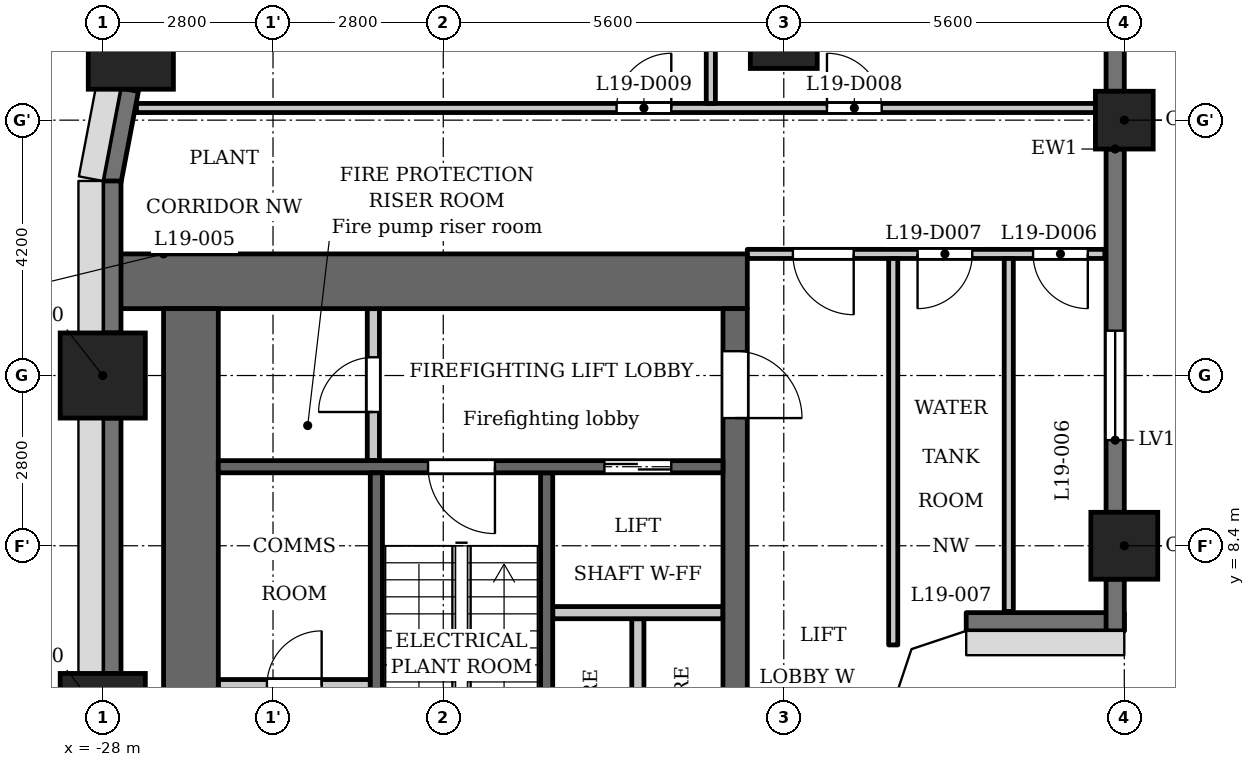
"""IFC4 building model, lengths in metres.
Left out: names, types, materials, properties, quantities, classifications, styles, units other than length and angle.
Written with IfcOpenShell. Run it as: python <this file> out.ifc"""

import sys

from ifc_helpers import new_model, si_unit, direction, frame, frame_2d, origin, origin_2d, place, context, subcontext, project, spatial, polyline, rectangle, outline, extrude, element, fill, save


model = new_model("IFC4")
c1 = context("Model", 3, precision=1e-05, world=origin(), true_north=direction((0.0, 1.0)))
c2 = subcontext(c1, "Body", "Model", "MODEL_VIEW")
j1 = project(units=[si_unit("LENGTHUNIT", "METRE"), si_unit("PLANEANGLEUNIT", "RADIAN")], contexts=[c1])
p1 = place(None, origin())
s1 = spatial("IfcSite", under=j1, at=p1, CompositionType="ELEMENT")
p2 = place(p1, origin())
s2 = spatial("IfcBuilding", under=s1, at=p2, CompositionType="ELEMENT")
p3 = place(p2, frame((0.0, 0.0, 77.9)))
s3 = spatial("IfcBuildingStorey", under=s2, at=p3, CompositionType="ELEMENT", Elevation=77.9)
for number, where, z_axis, x_axis in (
    (1, (-27.538, 16.609, 0.0), (0.0, 0.0, 1.0), (1.0, 0.0, 0.0)),
    (2, (-28.0, 11.2, 0.0), (0.0, 0.0, 1.0), (1.0, 0.0, 0.0)),
    (3, (-28.0, 5.6, 0.0), (0.0, 0.0, 1.0), (1.0, 0.0, 0.0)),
):
    element("IfcColumn", number, at=place(p3, frame(where, z_axis=z_axis, x_axis=x_axis)), inside=s3, PredefinedType="COLUMN", context=c2, shape_type="SweptSolid", body=[
        extrude(rectangle(XDim=1.4, YDim=1.4, at=origin_2d()), origin(), (0.0, 0.0, 1.0), 5.4),
    ])
for number, where, z_axis, x_axis in (
    (4, (-16.8, 16.8, 0.0), (0.0, 0.0, 1.0), (1.0, 0.0, 0.0)),
    (5, (-11.2, 8.4, 0.0), (0.0, 0.0, 1.0), (1.0, 0.0, 0.0)),
):
    element("IfcColumn", number, at=place(p3, frame(where, z_axis=z_axis, x_axis=x_axis)), inside=s3, PredefinedType="COLUMN", context=c2, shape_type="SweptSolid", body=[
        extrude(rectangle(XDim=1.1, YDim=1.1, at=origin_2d()), origin(), (0.0, 0.0, 1.0), 5.4),
    ])
p4 = place(p3, frame((-11.2, 15.4, 0.0), z_axis=(0.0, 0.0, 1.0), x_axis=(1.0, 0.0, 0.0)))
e6 = element("IfcColumn", 6, at=p4, inside=s3, PredefinedType="COLUMN", context=c2, shape_type="SweptSolid", body=[
    extrude(rectangle(XDim=0.95, YDim=0.95, at=origin_2d()), origin(), (0.0, 0.0, 1.0), 5.4),
])
p5 = place(p3, frame((-13.8, 7.15, 0.0), z_axis=(0.0, 0.0, 1.0), x_axis=(1.0, 0.0, 0.0)))
e7 = element("IfcWall", 7, at=p5, inside=s3, PredefinedType="SOLIDWALL", context=c2, shape_type="SweptSolid", body=[
    extrude(rectangle(XDim=2.6, YDim=0.3, at=frame_2d((1.3, 0.0))), origin(), (0.0, 0.0, 1.0), 5.1),
])
p6 = place(p3, frame((-11.35, 7.0, 0.0), z_axis=(0.0, 0.0, 1.0), x_axis=(0.0, 1.0, 0.0)))
e8 = element("IfcWall", 8, at=p6, inside=s3, PredefinedType="SOLIDWALL", context=c2, shape_type="SweptSolid", body=[
    extrude(rectangle(XDim=0.85, YDim=0.3, at=frame_2d((0.425, 0.0))), origin(), (0.0, 0.0, 1.0), 5.1),
])
p7 = place(p3, frame((-11.35, 8.95, 0.0), z_axis=(0.0, 0.0, 1.0), x_axis=(0.0, 1.0, 0.0)))
e9 = element("IfcWall", 9, at=p7, inside=s3, PredefinedType="SOLIDWALL", context=c2, shape_type="SweptSolid", body=[
    extrude(rectangle(XDim=5.975, YDim=0.3, at=frame_2d((2.988, 0.0))), origin(), (0.0, 0.0, 1.0), 5.1),
])
p8 = place(p7, frame((1.188, 0.0, 0.9)))
e10 = element("IfcOpeningElement", 10, at=p8, cuts=e9, PredefinedType="OPENING", context=c2, shape_type="SweptSolid", body=[
    extrude(rectangle(XDim=1.8, YDim=1.5, at=frame_2d((0.9, 0.75))), frame((0.0, 0.16, 0.0), z_axis=(0.0, -1.0, 0.0), x_axis=(1.0, 0.0, 0.0)), (0.0, 0.0, 1.0), 0.32),
])
p9 = place(p3, frame((-11.35, 15.875, 0.0), z_axis=(0.0, 0.0, 1.0), x_axis=(0.0, 1.0, 0.0)))
e11 = element("IfcWall", 11, at=p9, inside=s3, PredefinedType="SOLIDWALL", context=c2, shape_type="SweptSolid", body=[
    extrude(rectangle(XDim=5.825, YDim=0.3, at=frame_2d((2.913, 0.0))), origin(), (0.0, 0.0, 1.0), 5.1),
])
p10 = place(p9, frame((2.012, 0.0, 0.9)))
e12 = element("IfcOpeningElement", 12, at=p10, cuts=e11, PredefinedType="OPENING", context=c2, shape_type="SweptSolid", body=[
    extrude(rectangle(XDim=1.8, YDim=1.5, at=frame_2d((0.9, 0.75))), frame((0.0, 0.16, 0.0), z_axis=(0.0, -1.0, 0.0), x_axis=(1.0, 0.0, 0.0)), (0.0, 0.0, 1.0), 0.32),
])
p11 = place(p3, frame((-27.561, 15.9, 0.0), z_axis=(0.0, 0.0, 1.0), x_axis=(-0.187328386968, -0.982297345734, 0.0)))
e13 = element("IfcWall", 13, at=p11, inside=s3, PredefinedType="SOLIDWALL", context=c2, shape_type="SweptSolid", body=[
    extrude(rectangle(XDim=1.556, YDim=0.3, at=frame_2d((0.778, 0.0))), origin(), (0.0, 0.0, 1.0), 4.25),
])
p12 = place(p3, frame((-27.85, 14.4, 0.0), z_axis=(0.0, 0.0, 1.0), x_axis=(0.0, -1.0, 0.0)))
e14 = element("IfcWall", 14, at=p12, inside=s3, PredefinedType="SOLIDWALL", context=c2, shape_type="SweptSolid", body=[
    extrude(rectangle(XDim=2.5, YDim=0.3, at=frame_2d((1.25, 0.0))), origin(), (0.0, 0.0, 1.0), 4.25),
])
p13 = place(p3, frame((-27.85, 10.5, 0.0), z_axis=(0.0, 0.0, 1.0), x_axis=(0.0, -1.0, 0.0)))
e15 = element("IfcWall", 15, at=p13, inside=s3, PredefinedType="SOLIDWALL", context=c2, shape_type="SweptSolid", body=[
    extrude(rectangle(XDim=4.2, YDim=0.3, at=frame_2d((2.1, 0.0))), origin(), (0.0, 0.0, 1.0), 4.25),
])
p14 = place(p3, frame((-20.7, 2.6, 0.0), z_axis=(0.0, 0.0, 1.0), x_axis=(0.0, 1.0, 0.0)))
e16 = element("IfcWall", 16, at=p14, inside=s3, PredefinedType="SHEAR", context=c2, shape_type="SweptSolid", body=[
    extrude(rectangle(XDim=7.0, YDim=0.2, at=frame_2d((3.5, 0.0))), origin(), (0.0, 0.0, 1.0), 5.1),
])
p15 = place(p3, frame((-17.4, 12.75, 0.0), z_axis=(0.0, 0.0, 1.0), x_axis=(-1.0, 0.0, 0.0)))
e17 = element("IfcWall", 17, at=p15, inside=s3, PredefinedType="SHEAR", context=c2, shape_type="SweptSolid", body=[
    extrude(rectangle(XDim=10.4, YDim=0.9, at=frame_2d((5.2, 0.0))), origin(), (0.0, 0.0, 1.0), 5.1),
])
p16 = place(p3, frame((-19.2, 2.6, 0.0), z_axis=(0.0, 0.0, 1.0), x_axis=(0.0, 1.0, 0.0)))
e18 = element("IfcWall", 18, at=p16, inside=s3, PredefinedType="PARTITIONING", context=c2, shape_type="SweptSolid", body=[
    extrude(rectangle(XDim=4.6, YDim=0.2, at=frame_2d((2.3, 0.0))), origin(), (0.0, 0.0, 1.0), 5.1),
])
p17 = place(p3, frame((-17.6, -12.3, 0.0), z_axis=(0.0, 0.0, 1.0), x_axis=(0.0, 1.0, 0.0)))
e19 = element("IfcWall", 19, at=p17, inside=s3, PredefinedType="SHEAR", context=c2, shape_type="SweptSolid", body=[
    extrude(rectangle(XDim=24.6, YDim=0.4, at=frame_2d((12.3, 0.0))), origin(), (0.0, 0.0, 1.0), 5.1),
])
p18 = place(p17, frame((6.0, 0.0, 0.0)))
e20 = element("IfcOpeningElement", 20, at=p18, cuts=e19, PredefinedType="OPENING", context=c2, shape_type="SweptSolid", body=[
    extrude(rectangle(XDim=1.1, YDim=2.1, at=frame_2d((0.55, 1.05))), frame((0.0, 0.21, 0.0), z_axis=(0.0, -1.0, 0.0), x_axis=(1.0, 0.0, 0.0)), (0.0, 0.0, 1.0), 0.42),
])
p19 = place(p17, frame((8.4, 0.0, 0.0)))
e21 = element("IfcOpeningElement", 21, at=p19, cuts=e19, PredefinedType="OPENING", context=c2, shape_type="SweptSolid", body=[
    extrude(rectangle(XDim=1.1, YDim=2.1, at=frame_2d((0.55, 1.05))), frame((0.0, 0.21, 0.0), z_axis=(0.0, -1.0, 0.0), x_axis=(1.0, 0.0, 0.0)), (0.0, 0.0, 1.0), 0.42),
])
p20 = place(p17, frame((10.8, 0.0, 0.0)))
e22 = element("IfcOpeningElement", 22, at=p20, cuts=e19, PredefinedType="OPENING", context=c2, shape_type="SweptSolid", body=[
    extrude(rectangle(XDim=1.1, YDim=2.1, at=frame_2d((0.55, 1.05))), frame((0.0, 0.21, 0.0), z_axis=(0.0, -1.0, 0.0), x_axis=(1.0, 0.0, 0.0)), (0.0, 0.0, 1.0), 0.42),
])
p21 = place(p17, frame((16.75, 0.0, 0.0)))
e23 = element("IfcOpeningElement", 23, at=p21, cuts=e19, PredefinedType="OPENING", context=c2, shape_type="SweptSolid", body=[
    extrude(rectangle(XDim=0.9, YDim=2.1, at=frame_2d((0.45, 1.05))), frame((0.0, 0.21, 0.0), z_axis=(0.0, -1.0, 0.0), x_axis=(1.0, 0.0, 0.0)), (0.0, 0.0, 1.0), 0.42),
])
p22 = place(p17, frame((22.8, 0.0, 0.0)))
e24 = element("IfcOpeningElement", 24, at=p22, cuts=e19, PredefinedType="OPENING", context=c2, shape_type="SweptSolid", body=[
    extrude(rectangle(XDim=1.1, YDim=2.1, at=frame_2d((0.55, 1.05))), frame((0.0, 0.21, 0.0), z_axis=(0.0, -1.0, 0.0), x_axis=(1.0, 0.0, 0.0)), (0.0, 0.0, 1.0), 0.42),
])
p23 = place(p17, frame((0.7, 0.0, 0.0)))
e25 = element("IfcOpeningElement", 25, at=p23, cuts=e19, PredefinedType="OPENING", context=c2, shape_type="SweptSolid", body=[
    extrude(rectangle(XDim=1.1, YDim=2.1, at=frame_2d((0.55, 1.05))), frame((0.0, 0.21, 0.0), z_axis=(0.0, -1.0, 0.0), x_axis=(1.0, 0.0, 0.0)), (0.0, 0.0, 1.0), 0.42),
])
p24 = place(p17, frame((12.775, 0.0, 0.0)))
e26 = element("IfcOpeningElement", 26, at=p24, cuts=e19, PredefinedType="OPENING", context=c2, shape_type="SweptSolid", body=[
    extrude(rectangle(XDim=1.8, YDim=2.1, at=frame_2d((0.9, 1.05))), frame((0.0, 0.21, 0.0), z_axis=(0.0, -1.0, 0.0), x_axis=(1.0, 0.0, 0.0)), (0.0, 0.0, 1.0), 0.42),
])
p25 = place(p3, frame((-26.55, -12.3, 0.0), z_axis=(0.0, 0.0, 1.0), x_axis=(0.0, 1.0, 0.0)))
e27 = element("IfcWall", 27, at=p25, inside=s3, PredefinedType="SHEAR", context=c2, shape_type="SweptSolid", body=[
    extrude(rectangle(XDim=24.6, YDim=0.9, at=frame_2d((12.3, 0.0))), origin(), (0.0, 0.0, 1.0), 5.1),
])
p26 = place(p3, frame((-23.55, 9.8, 0.0), z_axis=(0.0, 0.0, 1.0), x_axis=(0.0, 1.0, 0.0)))
e28 = element("IfcWall", 28, at=p26, inside=s3, PredefinedType="PARTITIONING", context=c2, shape_type="SweptSolid", body=[
    extrude(rectangle(XDim=2.5, YDim=0.2, at=frame_2d((1.25, 0.0))), origin(), (0.0, 0.0, 1.0), 5.1),
])
p27 = place(p26, frame((0.8, 0.0, 0.0)))
e29 = element("IfcOpeningElement", 29, at=p27, cuts=e28, PredefinedType="OPENING", context=c2, shape_type="SweptSolid", body=[
    extrude(rectangle(XDim=0.9, YDim=2.1, at=frame_2d((0.45, 1.05))), frame((0.0, 0.11, 0.0), z_axis=(0.0, -1.0, 0.0), x_axis=(1.0, 0.0, 0.0)), (0.0, 0.0, 1.0), 0.22),
])
p28 = place(p3, frame((-23.6, 6.1, 0.0), z_axis=(0.0, 0.0, 1.0), x_axis=(-1.0, 0.0, 0.0)))
e30 = element("IfcWall", 30, at=p28, inside=s3, PredefinedType="PARTITIONING", context=c2, shape_type="SweptSolid", body=[
    extrude(rectangle(XDim=2.5, YDim=0.2, at=frame_2d((1.25, 0.0))), origin(), (0.0, 0.0, 1.0), 5.1),
])
p29 = place(p28, frame((0.8, 0.0, 0.0)))
e31 = element("IfcOpeningElement", 31, at=p29, cuts=e30, PredefinedType="OPENING", context=c2, shape_type="SweptSolid", body=[
    extrude(rectangle(XDim=0.9, YDim=2.1, at=frame_2d((0.45, 1.05))), frame((0.0, 0.11, 0.0), z_axis=(0.0, -1.0, 0.0), x_axis=(1.0, 0.0, 0.0)), (0.0, 0.0, 1.0), 0.22),
])
p30 = place(p3, frame((-17.8, 7.3, 0.0), z_axis=(0.0, 0.0, 1.0), x_axis=(-1.0, 0.0, 0.0)))
e32 = element("IfcWall", 32, at=p30, inside=s3, PredefinedType="PARTITIONING", context=c2, shape_type="SweptSolid", body=[
    extrude(rectangle(XDim=2.8, YDim=0.2, at=frame_2d((1.4, 0.0))), origin(), (0.0, 0.0, 1.0), 5.1),
])
p31 = place(p3, frame((-17.8, 9.7, 0.0), z_axis=(0.0, 0.0, 1.0), x_axis=(-1.0, 0.0, 0.0)))
e33 = element("IfcWall", 33, at=p31, inside=s3, PredefinedType="SHEAR", context=c2, shape_type="SweptSolid", body=[
    extrude(rectangle(XDim=8.3, YDim=0.2, at=frame_2d((4.15, 0.0))), origin(), (0.0, 0.0, 1.0), 5.1),
])
p32 = place(p31, frame((0.85, 0.0, 0.0)))
e34 = element("IfcOpeningElement", 34, at=p32, cuts=e33, PredefinedType="OPENING", context=c2, shape_type="SweptSolid", body=[
    extrude(rectangle(XDim=1.1, YDim=2.1, at=frame_2d((0.55, 1.05))), frame((0.0, 0.11, 0.0), z_axis=(0.0, -1.0, 0.0), x_axis=(1.0, 0.0, 0.0)), (0.0, 0.0, 1.0), 0.22),
])
p33 = place(p31, frame((3.75, 0.0, 0.0)))
e35 = element("IfcOpeningElement", 35, at=p33, cuts=e33, PredefinedType="OPENING", context=c2, shape_type="SweptSolid", body=[
    extrude(rectangle(XDim=1.1, YDim=2.1, at=frame_2d((0.55, 1.05))), frame((0.0, 0.11, 0.0), z_axis=(0.0, -1.0, 0.0), x_axis=(1.0, 0.0, 0.0)), (0.0, 0.0, 1.0), 0.22),
])
p34 = place(p3, frame((-23.5, 2.6, 0.0), z_axis=(0.0, 0.0, 1.0), x_axis=(0.0, 1.0, 0.0)))
e36 = element("IfcWall", 36, at=p34, inside=s3, PredefinedType="SHEAR", context=c2, shape_type="SweptSolid", body=[
    extrude(rectangle(XDim=7.0, YDim=0.2, at=frame_2d((3.5, 0.0))), origin(), (0.0, 0.0, 1.0), 5.1),
])
p35 = place(p3, frame((-17.4, 13.2, 0.0), z_axis=(0.0, 0.0, 1.0), x_axis=(1.0, 0.0, 0.0)))
e37 = element("IfcWall", 37, at=p35, inside=s3, PredefinedType="PARTITIONING", context=c2, shape_type="SweptSolid", body=[
    extrude(rectangle(XDim=5.88, YDim=0.15, at=frame_2d((2.94, 0.0))), origin(), (0.0, 0.0, 1.0), 5.1),
])
p36 = place(p35, frame((0.75, 0.0, 0.0)))
e38 = element("IfcOpeningElement", 38, at=p36, cuts=e37, PredefinedType="OPENING", context=c2, shape_type="SweptSolid", body=[
    extrude(rectangle(XDim=1.0, YDim=2.1, at=frame_2d((0.5, 1.05))), frame((0.0, 0.085, 0.0), z_axis=(0.0, -1.0, 0.0), x_axis=(1.0, 0.0, 0.0)), (0.0, 0.0, 1.0), 0.17),
])
p37 = place(p35, frame((4.7, 0.0, 0.0)))
e39 = element("IfcOpeningElement", 39, at=p37, cuts=e37, PredefinedType="OPENING", context=c2, shape_type="SweptSolid", body=[
    extrude(rectangle(XDim=0.9, YDim=2.1, at=frame_2d((0.45, 1.05))), frame((0.0, 0.085, 0.0), z_axis=(0.0, -1.0, 0.0), x_axis=(1.0, 0.0, 0.0)), (0.0, 0.0, 1.0), 0.17),
])
p38 = place(p35, frame((2.8, 0.0, 0.0)))
e40 = element("IfcOpeningElement", 40, at=p38, cuts=e37, PredefinedType="OPENING", context=c2, shape_type="SweptSolid", body=[
    extrude(rectangle(XDim=0.9, YDim=2.1, at=frame_2d((0.45, 1.05))), frame((0.0, 0.085, 0.0), z_axis=(0.0, -1.0, 0.0), x_axis=(1.0, 0.0, 0.0)), (0.0, 0.0, 1.0), 0.17),
])
p39 = place(p3, frame((-27.446, 15.6, 0.0), z_axis=(0.0, 0.0, 1.0), x_axis=(1.0, 0.0, 0.0)))
e41 = element("IfcWall", 41, at=p39, inside=s3, PredefinedType="PARTITIONING", context=c2, shape_type="SweptSolid", body=[
    extrude(rectangle(XDim=16.156, YDim=0.15, at=frame_2d((8.078, 0.0))), origin(), (0.0, 0.0, 1.0), 5.1),
])
p40 = place(p39, frame((11.356, 0.0, 0.0)))
e42 = element("IfcOpeningElement", 42, at=p40, cuts=e41, PredefinedType="OPENING", context=c2, shape_type="SweptSolid", body=[
    extrude(rectangle(XDim=0.9, YDim=2.1, at=frame_2d((0.45, 1.05))), frame((0.0, 0.085, 0.0), z_axis=(0.0, -1.0, 0.0), x_axis=(1.0, 0.0, 0.0)), (0.0, 0.0, 1.0), 0.17),
])
p41 = place(p39, frame((7.896, 0.0, 0.0)))
e43 = element("IfcOpeningElement", 43, at=p41, cuts=e41, PredefinedType="OPENING", context=c2, shape_type="SweptSolid", body=[
    extrude(rectangle(XDim=0.9, YDim=2.1, at=frame_2d((0.45, 1.05))), frame((0.0, 0.085, 0.0), z_axis=(0.0, -1.0, 0.0), x_axis=(1.0, 0.0, 0.0)), (0.0, 0.0, 1.0), 0.17),
])
p42 = place(p3, frame((-18.0, 15.675, 0.0), z_axis=(0.0, 0.0, 1.0), x_axis=(0.0, 1.0, 0.0)))
e44 = element("IfcWall", 44, at=p42, inside=s3, PredefinedType="PARTITIONING", context=c2, shape_type="SweptSolid", body=[
    extrude(rectangle(XDim=6.405, YDim=0.15, at=frame_2d((3.203, 0.0))), origin(), (0.0, 0.0, 1.0), 5.1),
])
p43 = place(p3, frame((-15.0, 6.769, 0.0), z_axis=(0.0, 0.0, 1.0), x_axis=(0.0, 1.0, 0.0)))
e45 = element("IfcWall", 45, at=p43, inside=s3, PredefinedType="PARTITIONING", context=c2, shape_type="SweptSolid", body=[
    extrude(rectangle(XDim=6.356, YDim=0.15, at=frame_2d((3.178, 0.0))), origin(), (0.0, 0.0, 1.0), 5.1),
])
p44 = place(p3, frame((-13.1, 7.32, 0.0), z_axis=(0.0, 0.0, 1.0), x_axis=(0.0, 1.0, 0.0)))
e46 = element("IfcWall", 46, at=p44, inside=s3, PredefinedType="PARTITIONING", context=c2, shape_type="SweptSolid", body=[
    extrude(rectangle(XDim=5.805, YDim=0.15, at=frame_2d((2.902, 0.0))), origin(), (0.0, 0.0, 1.0), 5.1),
])
p45 = place(p3, origin())
e47 = element("IfcWall", 47, at=p45, inside=s3, PredefinedType="SOLIDWALL", context=c2, shape_type="SweptSolid", body=[
    extrude(outline(polyline([(-15.0, 5.8), (-14.7, 6.7), (-13.8, 7.0), (-13.8, 7.3), (-13.849, 7.3), (-14.937, 6.937), (-15.3, 5.849), (-15.3, 5.8), (-15.0, 5.8)])), origin(), (0.0, 0.0, 1.0), 5.1),
])
p46 = place(p32, origin())
e48 = element("IfcDoor", 48, at=p46, inside=s3, OperationType="DOUBLE_DOOR_SLIDING", PredefinedType="DOOR", context=c2, shape_type="SweptSolid", body=[
    extrude(rectangle(XDim=1.1, YDim=2.1, at=frame_2d((0.55, 1.05))), frame((0.0, 0.025, 0.0), z_axis=(0.0, -1.0, 0.0), x_axis=(1.0, 0.0, 0.0)), (0.0, 0.0, 1.0), 0.05),
])
fill(e34, e48)
p47 = place(p22, origin())
e49 = element("IfcDoor", 49, at=p47, inside=s3, OperationType="SINGLE_SWING_LEFT", PredefinedType="DOOR", context=c2, shape_type="SweptSolid", body=[
    extrude(rectangle(XDim=1.1, YDim=2.1, at=frame_2d((0.55, 1.05))), frame((0.0, 0.025, 0.0), z_axis=(0.0, -1.0, 0.0), x_axis=(1.0, 0.0, 0.0)), (0.0, 0.0, 1.0), 0.05),
])
fill(e24, e49)
p48 = place(p27, origin())
e50 = element("IfcDoor", 50, at=p48, inside=s3, OperationType="SINGLE_SWING_RIGHT", PredefinedType="DOOR", context=c2, shape_type="SweptSolid", body=[
    extrude(rectangle(XDim=0.9, YDim=2.1, at=frame_2d((0.45, 1.05))), frame((0.0, 0.025, 0.0), z_axis=(0.0, -1.0, 0.0), x_axis=(1.0, 0.0, 0.0)), (0.0, 0.0, 1.0), 0.05),
])
fill(e29, e50)
p49 = place(p33, origin())
e51 = element("IfcDoor", 51, at=p49, inside=s3, OperationType="SINGLE_SWING_RIGHT", PredefinedType="DOOR", context=c2, shape_type="SweptSolid", body=[
    extrude(rectangle(XDim=1.1, YDim=2.1, at=frame_2d((0.55, 1.05))), frame((0.0, 0.025, 0.0), z_axis=(0.0, -1.0, 0.0), x_axis=(1.0, 0.0, 0.0)), (0.0, 0.0, 1.0), 0.05),
])
fill(e35, e51)
p50 = place(p29, origin())
e52 = element("IfcDoor", 52, at=p50, inside=s3, OperationType="SINGLE_SWING_LEFT", PredefinedType="DOOR", context=c2, shape_type="SweptSolid", body=[
    extrude(rectangle(XDim=0.9, YDim=2.1, at=frame_2d((0.45, 1.05))), frame((0.0, 0.025, 0.0), z_axis=(0.0, -1.0, 0.0), x_axis=(1.0, 0.0, 0.0)), (0.0, 0.0, 1.0), 0.05),
])
fill(e31, e52)
p51 = place(p36, origin())
e53 = element("IfcDoor", 53, at=p51, inside=s3, OperationType="SINGLE_SWING_RIGHT", PredefinedType="DOOR", context=c2, shape_type="SweptSolid", body=[
    extrude(rectangle(XDim=1.0, YDim=2.1, at=frame_2d((0.5, 1.05))), frame((0.0, 0.025, 0.0), z_axis=(0.0, -1.0, 0.0), x_axis=(1.0, 0.0, 0.0)), (0.0, 0.0, 1.0), 0.05),
])
fill(e38, e53)
p52 = place(p37, origin())
e54 = element("IfcDoor", 54, at=p52, inside=s3, OperationType="SINGLE_SWING_RIGHT", PredefinedType="DOOR", context=c2, shape_type="SweptSolid", body=[
    extrude(rectangle(XDim=0.9, YDim=2.1, at=frame_2d((0.45, 1.05))), frame((0.0, 0.025, 0.0), z_axis=(0.0, -1.0, 0.0), x_axis=(1.0, 0.0, 0.0)), (0.0, 0.0, 1.0), 0.05),
])
fill(e39, e54)
p53 = place(p38, origin())
e55 = element("IfcDoor", 55, at=p53, inside=s3, OperationType="SINGLE_SWING_LEFT", PredefinedType="DOOR", context=c2, shape_type="SweptSolid", body=[
    extrude(rectangle(XDim=0.9, YDim=2.1, at=frame_2d((0.45, 1.05))), frame((0.0, 0.025, 0.0), z_axis=(0.0, -1.0, 0.0), x_axis=(1.0, 0.0, 0.0)), (0.0, 0.0, 1.0), 0.05),
])
fill(e40, e55)
p54 = place(p40, origin())
e56 = element("IfcDoor", 56, at=p54, inside=s3, OperationType="SINGLE_SWING_RIGHT", PredefinedType="DOOR", context=c2, shape_type="SweptSolid", body=[
    extrude(rectangle(XDim=0.9, YDim=2.1, at=frame_2d((0.45, 1.05))), frame((0.0, 0.025, 0.0), z_axis=(0.0, -1.0, 0.0), x_axis=(1.0, 0.0, 0.0)), (0.0, 0.0, 1.0), 0.05),
])
fill(e42, e56)
p55 = place(p41, origin())
e57 = element("IfcDoor", 57, at=p55, inside=s3, OperationType="SINGLE_SWING_LEFT", PredefinedType="DOOR", context=c2, shape_type="SweptSolid", body=[
    extrude(rectangle(XDim=0.9, YDim=2.1, at=frame_2d((0.45, 1.05))), frame((0.0, 0.025, 0.0), z_axis=(0.0, -1.0, 0.0), x_axis=(1.0, 0.0, 0.0)), (0.0, 0.0, 1.0), 0.05),
])
fill(e43, e57)
p56 = place(p8, origin())
e58 = element("IfcWindow", 58, at=p56, inside=s3, PartitioningType="SINGLE_PANEL", PredefinedType="WINDOW", context=c2, shape_type="SweptSolid", body=[
    extrude(rectangle(XDim=1.8, YDim=1.5, at=frame_2d((0.9, 0.75))), frame((0.0, 0.03, 0.0), z_axis=(0.0, -1.0, 0.0), x_axis=(1.0, 0.0, 0.0)), (0.0, 0.0, 1.0), 0.06),
])
fill(e10, e58)
save(model, sys.argv[1])
